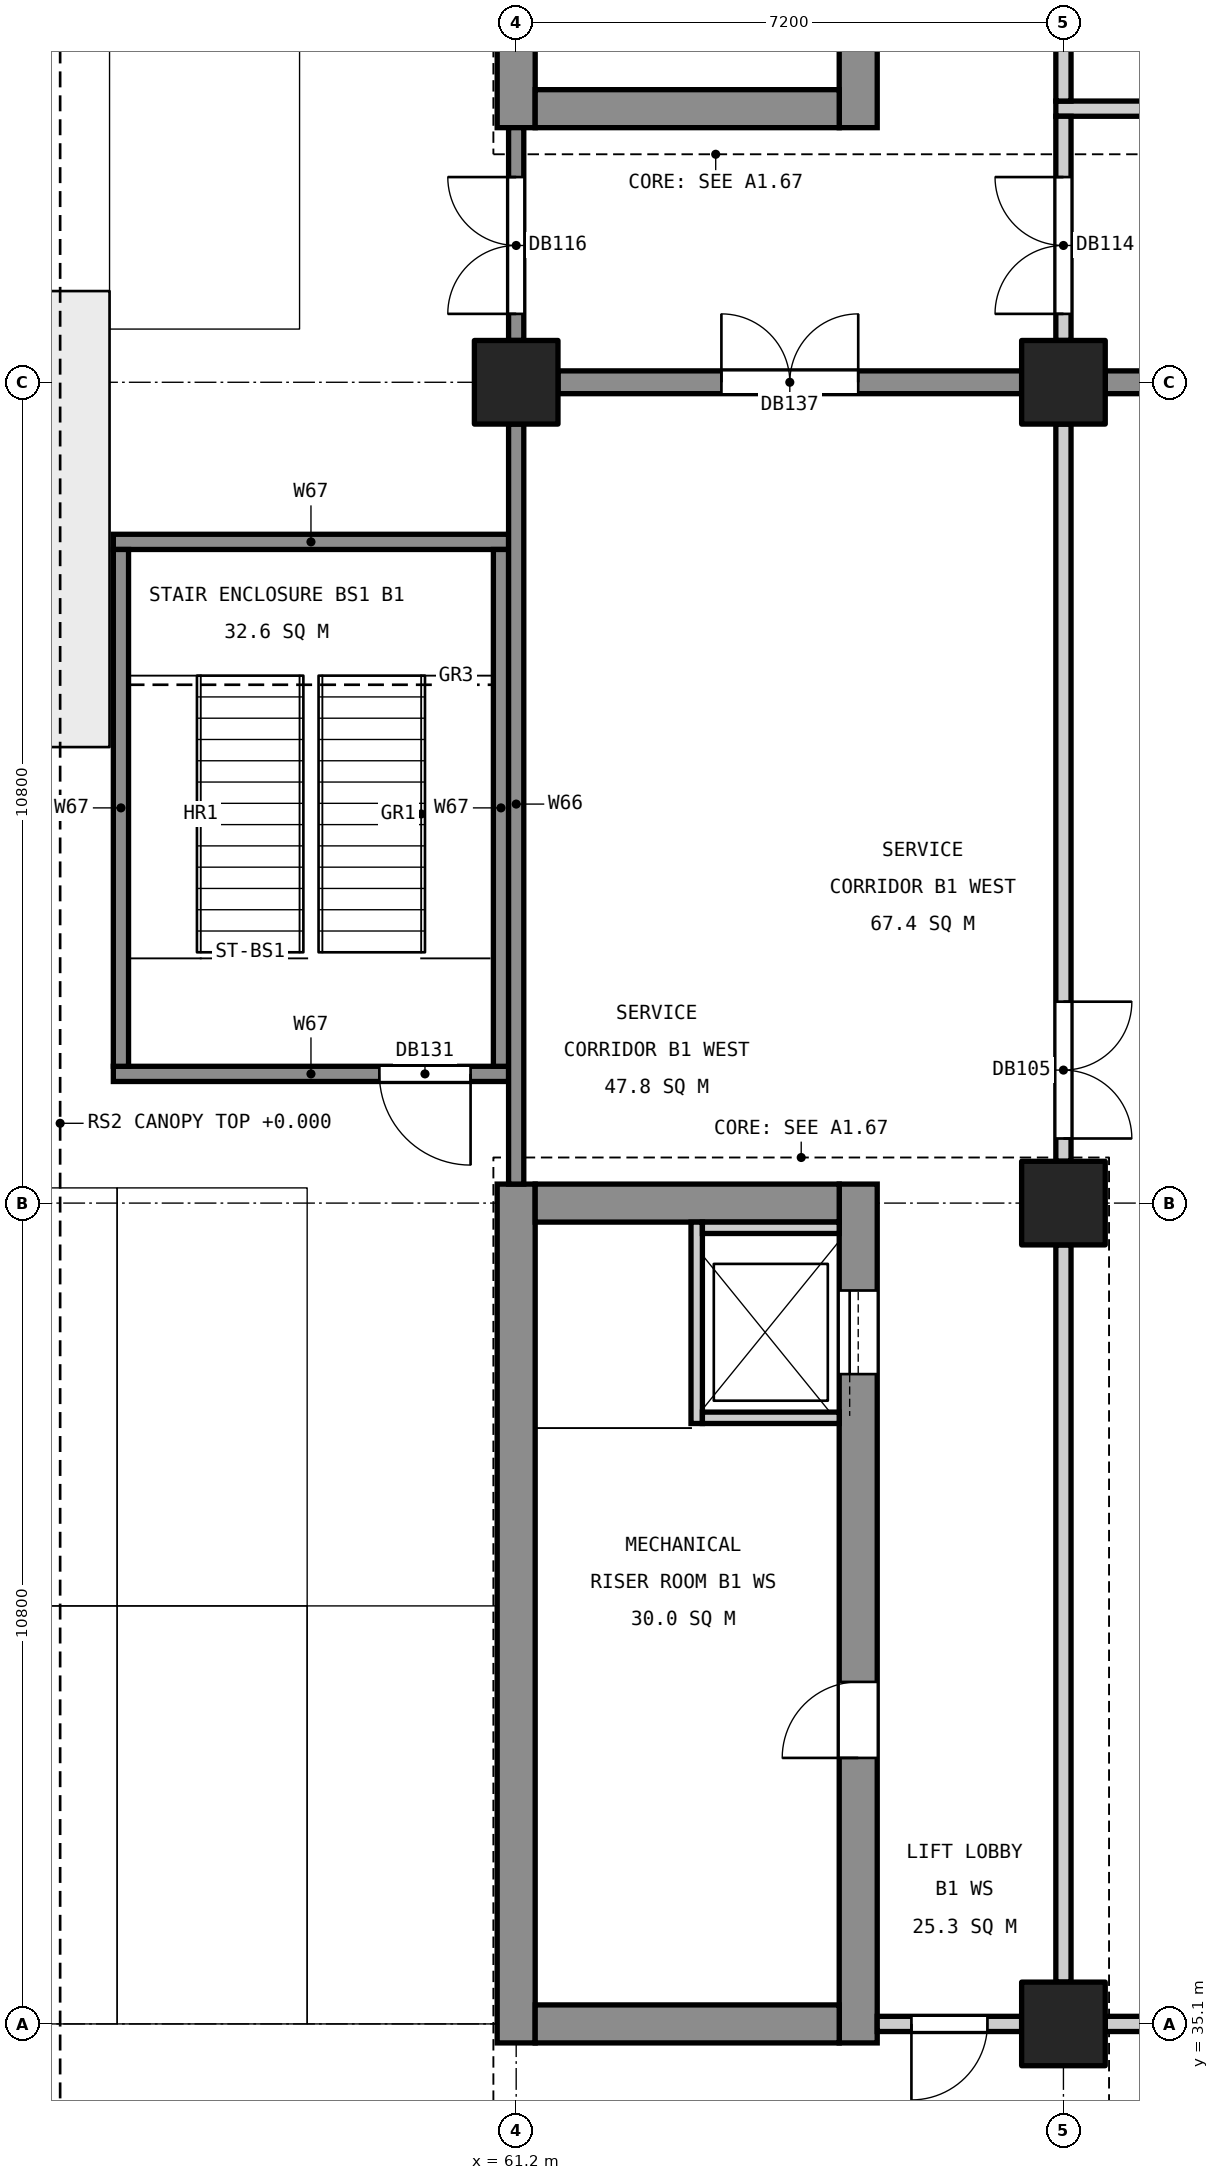
"""IFC4 building model, lengths in metres.
Left out: names, types, materials, properties, quantities, classifications, styles, units other than length and angle.
Written with IfcOpenShell. Run it as: python <this file> out.ifc"""

import sys

from ifc_helpers import new_model, si_unit, direction, frame, frame_2d, origin, origin_2d, place, context, subcontext, project, spatial, rectangle, extrude, element, fill, save


model = new_model("IFC4")
c1 = context("Model", 3, precision=1e-05, world=origin(), true_north=direction((0.0, 1.0)))
c2 = subcontext(c1, "Body", "Model", "MODEL_VIEW")
j1 = project(units=[si_unit("LENGTHUNIT", "METRE"), si_unit("PLANEANGLEUNIT", "RADIAN")], contexts=[c1])
p1 = place(None, origin())
s1 = spatial("IfcSite", under=j1, at=p1, CompositionType="ELEMENT")
p2 = place(p1, origin())
s2 = spatial("IfcBuilding", under=s1, at=p2, CompositionType="ELEMENT")
p3 = place(p2, frame((0.0, 0.0, -4.8)))
s3 = spatial("IfcBuildingStorey", under=s2, at=p3, CompositionType="ELEMENT", Elevation=-4.8)
for number, where, z_axis, x_axis in (
    (1, (61.2, 56.7, 0.0), (0.0, 0.0, 1.0), (1.0, 0.0, 0.0)),
    (2, (68.4, 35.1, 0.0), (0.0, 0.0, 1.0), (1.0, 0.0, 0.0)),
    (3, (68.4, 45.9, 0.0), (0.0, 0.0, 1.0), (1.0, 0.0, 0.0)),
    (4, (68.4, 56.7, 0.0), (0.0, 0.0, 1.0), (1.0, 0.0, 0.0)),
):
    element("IfcColumn", number, at=place(p3, frame(where, z_axis=z_axis, x_axis=x_axis)), inside=s3, PredefinedType="COLUMN", context=c2, shape_type="SweptSolid", body=[
        extrude(rectangle(XDim=1.1, YDim=1.1, at=origin_2d()), origin(), (0.0, 0.0, 1.0), 4.5),
    ])
p4 = place(p3, frame((61.2, 34.85, 0.0), z_axis=(0.0, 0.0, 1.0), x_axis=(0.0, 1.0, 0.0)))
e5 = element("IfcWall", 5, at=p4, inside=s3, PredefinedType="SHEAR", context=c2, shape_type="SweptSolid", body=[
    extrude(rectangle(XDim=11.3, YDim=0.5, at=frame_2d((5.65, 0.0))), origin(), (0.0, 0.0, 1.0), 4.5),
])
p5 = place(p3, frame((65.7, 34.85, 0.0), z_axis=(0.0, 0.0, 1.0), x_axis=(0.0, 1.0, 0.0)))
e6 = element("IfcWall", 6, at=p5, inside=s3, PredefinedType="SHEAR", context=c2, shape_type="SweptSolid", body=[
    extrude(rectangle(XDim=11.3, YDim=0.5, at=frame_2d((5.65, 0.0))), origin(), (0.0, 0.0, 1.0), 4.5),
])
p6 = place(p5, frame((8.8, 0.0, 0.0)))
e7 = element("IfcOpeningElement", 7, at=p6, cuts=e6, PredefinedType="OPENING", context=c2, shape_type="SweptSolid", body=[
    extrude(rectangle(XDim=1.1, YDim=2.1, at=frame_2d((0.55, 1.05))), frame((0.0, 0.26, 0.0), z_axis=(0.0, -1.0, 0.0), x_axis=(1.0, 0.0, 0.0)), (0.0, 0.0, 1.0), 0.52),
])
p7 = place(p5, frame((3.75, 0.0, 0.0)))
e8 = element("IfcOpeningElement", 8, at=p7, cuts=e6, PredefinedType="OPENING", context=c2, shape_type="SweptSolid", body=[
    extrude(rectangle(XDim=1.0, YDim=2.1, at=frame_2d((0.5, 1.05))), frame((0.0, 0.26, 0.0), z_axis=(0.0, -1.0, 0.0), x_axis=(1.0, 0.0, 0.0)), (0.0, 0.0, 1.0), 0.52),
])
for number, where, z_axis, x_axis in (
    (9, (61.45, 35.1, 0.0), (0.0, 0.0, 1.0), (1.0, 0.0, 0.0)),
    (10, (61.45, 45.9, 0.0), (0.0, 0.0, 1.0), (1.0, 0.0, 0.0)),
):
    element("IfcWall", number, at=place(p3, frame(where, z_axis=z_axis, x_axis=x_axis)), inside=s3, PredefinedType="SHEAR", context=c2, shape_type="SweptSolid", body=[
        extrude(rectangle(XDim=4.0, YDim=0.5, at=frame_2d((2.0, 0.0))), origin(), (0.0, 0.0, 1.0), 4.5),
    ])
p8 = place(p3, frame((61.2, 60.05, 0.0), z_axis=(0.0, 0.0, 1.0), x_axis=(0.0, 1.0, 0.0)))
e11 = element("IfcWall", 11, at=p8, inside=s3, PredefinedType="SHEAR", context=c2, shape_type="SweptSolid", body=[
    extrude(rectangle(XDim=14.9, YDim=0.5, at=frame_2d((7.45, 0.0))), origin(), (0.0, 0.0, 1.0), 4.5),
])
p9 = place(p3, frame((65.7, 60.05, 0.0), z_axis=(0.0, 0.0, 1.0), x_axis=(0.0, 1.0, 0.0)))
e12 = element("IfcWall", 12, at=p9, inside=s3, PredefinedType="SHEAR", context=c2, shape_type="SweptSolid", body=[
    extrude(rectangle(XDim=14.9, YDim=0.5, at=frame_2d((7.45, 0.0))), origin(), (0.0, 0.0, 1.0), 4.5),
])
p10 = place(p9, frame((8.85, 0.0, 0.0)))
e13 = element("IfcOpeningElement", 13, at=p10, cuts=e12, PredefinedType="OPENING", context=c2, shape_type="SweptSolid", body=[
    extrude(rectangle(XDim=1.1, YDim=2.1, at=frame_2d((0.55, 1.05))), frame((0.0, 0.26, 0.0), z_axis=(0.0, -1.0, 0.0), x_axis=(1.0, 0.0, 0.0)), (0.0, 0.0, 1.0), 0.52),
])
p11 = place(p9, frame((11.4, 0.0, 0.0)))
e14 = element("IfcOpeningElement", 14, at=p11, cuts=e12, PredefinedType="OPENING", context=c2, shape_type="SweptSolid", body=[
    extrude(rectangle(XDim=1.1, YDim=2.1, at=frame_2d((0.55, 1.05))), frame((0.0, 0.26, 0.0), z_axis=(0.0, -1.0, 0.0), x_axis=(1.0, 0.0, 0.0)), (0.0, 0.0, 1.0), 0.52),
])
p12 = place(p9, frame((3.75, 0.0, 0.0)))
e15 = element("IfcOpeningElement", 15, at=p12, cuts=e12, PredefinedType="OPENING", context=c2, shape_type="SweptSolid", body=[
    extrude(rectangle(XDim=1.0, YDim=2.1, at=frame_2d((0.5, 1.05))), frame((0.0, 0.26, 0.0), z_axis=(0.0, -1.0, 0.0), x_axis=(1.0, 0.0, 0.0)), (0.0, 0.0, 1.0), 0.52),
])
p13 = place(p3, frame((61.45, 60.3, 0.0), z_axis=(0.0, 0.0, 1.0), x_axis=(1.0, 0.0, 0.0)))
e16 = element("IfcWall", 16, at=p13, inside=s3, PredefinedType="SHEAR", context=c2, shape_type="SweptSolid", body=[
    extrude(rectangle(XDim=4.0, YDim=0.5, at=frame_2d((2.0, 0.0))), origin(), (0.0, 0.0, 1.0), 4.5),
])
p14 = place(p3, frame((61.75, 56.7, 0.0), z_axis=(0.0, 0.0, 1.0), x_axis=(1.0, 0.0, 0.0)))
e17 = element("IfcWall", 17, at=p14, inside=s3, PredefinedType="SHEAR", context=c2, shape_type="SweptSolid", body=[
    extrude(rectangle(XDim=6.1, YDim=0.3, at=frame_2d((3.05, 0.0))), origin(), (0.0, 0.0, 1.0), 4.5),
])
p15 = place(p14, frame((2.15, 0.0, 0.0)))
e18 = element("IfcOpeningElement", 18, at=p15, cuts=e17, PredefinedType="OPENING", context=c2, shape_type="SweptSolid", body=[
    extrude(rectangle(XDim=1.8, YDim=2.1, at=frame_2d((0.9, 1.05))), frame((0.0, 0.16, 0.0), z_axis=(0.0, -1.0, 0.0), x_axis=(1.0, 0.0, 0.0)), (0.0, 0.0, 1.0), 0.32),
])
p16 = place(p3, frame((68.95, 56.7, 0.0), z_axis=(0.0, 0.0, 1.0), x_axis=(1.0, 0.0, 0.0)))
e19 = element("IfcWall", 19, at=p16, inside=s3, PredefinedType="SHEAR", context=c2, shape_type="SweptSolid", body=[
    extrude(rectangle(XDim=9.7, YDim=0.3, at=frame_2d((4.85, 0.0))), origin(), (0.0, 0.0, 1.0), 4.5),
])
p17 = place(p3, frame((63.575, 43.0, 0.0), z_axis=(0.0, 0.0, 1.0), x_axis=(0.0, 1.0, 0.0)))
e20 = element("IfcWall", 20, at=p17, inside=s3, PredefinedType="SOLIDWALL", context=c2, shape_type="SweptSolid", body=[
    extrude(rectangle(XDim=2.65, YDim=0.15, at=frame_2d((1.325, 0.0))), origin(), (0.0, 0.0, 1.0), 4.8),
])
for number, where, z_axis, x_axis in (
    (21, (63.65, 43.075, 0.0), (0.0, 0.0, 1.0), (1.0, 0.0, 0.0)),
    (22, (63.65, 45.575, 0.0), (0.0, 0.0, 1.0), (1.0, 0.0, 0.0)),
):
    element("IfcWall", number, at=place(p3, frame(where, z_axis=z_axis, x_axis=x_axis)), inside=s3, PredefinedType="SOLIDWALL", context=c2, shape_type="SweptSolid", body=[
        extrude(rectangle(XDim=1.8, YDim=0.15, at=frame_2d((0.9, 0.0))), origin(), (0.0, 0.0, 1.0), 4.8),
    ])
p18 = place(p3, frame((65.95, 35.1, 0.0), z_axis=(0.0, 0.0, 1.0), x_axis=(1.0, 0.0, 0.0)))
e23 = element("IfcWall", 23, at=p18, inside=s3, PredefinedType="PARTITIONING", context=c2, shape_type="SweptSolid", body=[
    extrude(rectangle(XDim=1.9, YDim=0.2, at=frame_2d((0.95, 0.0))), origin(), (0.0, 0.0, 1.0), 3.7),
])
p19 = place(p18, frame((0.45, 0.0, 0.0)))
e24 = element("IfcOpeningElement", 24, at=p19, cuts=e23, PredefinedType="OPENING", context=c2, shape_type="SweptSolid", body=[
    extrude(rectangle(XDim=1.0, YDim=2.1, at=frame_2d((0.5, 1.05))), frame((0.0, 0.11, 0.0), z_axis=(0.0, -1.0, 0.0), x_axis=(1.0, 0.0, 0.0)), (0.0, 0.0, 1.0), 0.22),
])
p20 = place(p3, frame((68.95, 35.1, 0.0), z_axis=(0.0, 0.0, 1.0), x_axis=(1.0, 0.0, 0.0)))
e25 = element("IfcWall", 25, at=p20, inside=s3, PredefinedType="PARTITIONING", context=c2, shape_type="SweptSolid", body=[
    extrude(rectangle(XDim=9.7, YDim=0.2, at=frame_2d((4.85, 0.0))), origin(), (0.0, 0.0, 1.0), 3.7),
])
p21 = place(p3, frame((55.9, 47.6, 0.0), z_axis=(0.0, 0.0, 1.0), x_axis=(1.0, 0.0, 0.0)))
e26 = element("IfcWall", 26, at=p21, inside=s3, PredefinedType="SOLIDWALL", context=c2, shape_type="SweptSolid", body=[
    extrude(rectangle(XDim=5.2, YDim=0.2, at=frame_2d((2.6, 0.0))), origin(), (0.0, 0.0, 1.0), 4.35),
])
p22 = place(p21, frame((3.5, 0.0, 0.0)))
e27 = element("IfcOpeningElement", 27, at=p22, cuts=e26, PredefinedType="OPENING", context=c2, shape_type="SweptSolid", body=[
    extrude(rectangle(XDim=1.2, YDim=2.1, at=frame_2d((0.6, 1.05))), frame((0.0, 0.11, 0.0), z_axis=(0.0, -1.0, 0.0), x_axis=(1.0, 0.0, 0.0)), (0.0, 0.0, 1.0), 0.22),
])
p23 = place(p3, frame((55.9, 54.6, 0.0), z_axis=(0.0, 0.0, 1.0), x_axis=(1.0, 0.0, 0.0)))
e28 = element("IfcWall", 28, at=p23, inside=s3, PredefinedType="SOLIDWALL", context=c2, shape_type="SweptSolid", body=[
    extrude(rectangle(XDim=5.2, YDim=0.2, at=frame_2d((2.6, 0.0))), origin(), (0.0, 0.0, 1.0), 4.35),
])
p24 = place(p3, frame((68.3, 60.3, 0.0), z_axis=(0.0, 0.0, 1.0), x_axis=(1.0, 0.0, 0.0)))
e29 = element("IfcWall", 29, at=p24, inside=s3, PredefinedType="PARTITIONING", context=c2, shape_type="SweptSolid", body=[
    extrude(rectangle(XDim=11.0, YDim=0.2, at=frame_2d((5.5, 0.0))), origin(), (0.0, 0.0, 1.0), 3.7),
])
p25 = place(p3, frame((56.0, 47.7, 0.0), z_axis=(0.0, 0.0, 1.0), x_axis=(0.0, 1.0, 0.0)))
e30 = element("IfcWall", 30, at=p25, inside=s3, PredefinedType="SOLIDWALL", context=c2, shape_type="SweptSolid", body=[
    extrude(rectangle(XDim=6.8, YDim=0.2, at=frame_2d((3.4, 0.0))), origin(), (0.0, 0.0, 1.0), 4.35),
])
p26 = place(p3, frame((61.0, 47.7, 0.0), z_axis=(0.0, 0.0, 1.0), x_axis=(0.0, 1.0, 0.0)))
e31 = element("IfcWall", 31, at=p26, inside=s3, PredefinedType="SOLIDWALL", context=c2, shape_type="SweptSolid", body=[
    extrude(rectangle(XDim=6.8, YDim=0.2, at=frame_2d((3.4, 0.0))), origin(), (0.0, 0.0, 1.0), 4.5),
])
p27 = place(p3, frame((61.2, 46.15, 0.0), z_axis=(0.0, 0.0, 1.0), x_axis=(0.0, 1.0, 0.0)))
e32 = element("IfcWall", 32, at=p27, inside=s3, PredefinedType="SOLIDWALL", context=c2, shape_type="SweptSolid", body=[
    extrude(rectangle(XDim=10.0, YDim=0.2, at=frame_2d((5.0, 0.0))), origin(), (0.0, 0.0, 1.0), 4.5),
])
p28 = place(p3, frame((61.2, 57.25, 0.0), z_axis=(0.0, 0.0, 1.0), x_axis=(0.0, 1.0, 0.0)))
e33 = element("IfcWall", 33, at=p28, inside=s3, PredefinedType="SOLIDWALL", context=c2, shape_type="SweptSolid", body=[
    extrude(rectangle(XDim=2.8, YDim=0.2, at=frame_2d((1.4, 0.0))), origin(), (0.0, 0.0, 1.0), 4.5),
])
p29 = place(p28, frame((0.35, 0.0, 0.0)))
e34 = element("IfcOpeningElement", 34, at=p29, cuts=e33, PredefinedType="OPENING", context=c2, shape_type="SweptSolid", body=[
    extrude(rectangle(XDim=1.8, YDim=2.1, at=frame_2d((0.9, 1.05))), frame((0.0, 0.11, 0.0), z_axis=(0.0, -1.0, 0.0), x_axis=(1.0, 0.0, 0.0)), (0.0, 0.0, 1.0), 0.22),
])
p30 = place(p3, frame((68.4, 35.65, 0.0), z_axis=(0.0, 0.0, 1.0), x_axis=(0.0, 1.0, 0.0)))
e35 = element("IfcWall", 35, at=p30, inside=s3, PredefinedType="PARTITIONING", context=c2, shape_type="SweptSolid", body=[
    extrude(rectangle(XDim=9.7, YDim=0.2, at=frame_2d((4.85, 0.0))), origin(), (0.0, 0.0, 1.0), 3.4),
])
p31 = place(p3, frame((68.4, 46.45, 0.0), z_axis=(0.0, 0.0, 1.0), x_axis=(0.0, 1.0, 0.0)))
e36 = element("IfcWall", 36, at=p31, inside=s3, PredefinedType="PARTITIONING", context=c2, shape_type="SweptSolid", body=[
    extrude(rectangle(XDim=9.7, YDim=0.2, at=frame_2d((4.85, 0.0))), origin(), (0.0, 0.0, 1.0), 3.4),
])
p32 = place(p31, frame((0.3, 0.0, 0.0)))
e37 = element("IfcOpeningElement", 37, at=p32, cuts=e36, PredefinedType="OPENING", context=c2, shape_type="SweptSolid", body=[
    extrude(rectangle(XDim=1.8, YDim=2.1, at=frame_2d((0.9, 1.05))), frame((0.0, 0.11, 0.0), z_axis=(0.0, -1.0, 0.0), x_axis=(1.0, 0.0, 0.0)), (0.0, 0.0, 1.0), 0.22),
])
p33 = place(p3, frame((68.4, 57.25, 0.0), z_axis=(0.0, 0.0, 1.0), x_axis=(0.0, 1.0, 0.0)))
e38 = element("IfcWall", 38, at=p33, inside=s3, PredefinedType="PARTITIONING", context=c2, shape_type="SweptSolid", body=[
    extrude(rectangle(XDim=2.95, YDim=0.2, at=frame_2d((1.475, 0.0))), origin(), (0.0, 0.0, 1.0), 3.4),
])
p34 = place(p33, frame((0.35, 0.0, 0.0)))
e39 = element("IfcOpeningElement", 39, at=p34, cuts=e38, PredefinedType="OPENING", context=c2, shape_type="SweptSolid", body=[
    extrude(rectangle(XDim=1.8, YDim=2.1, at=frame_2d((0.9, 1.05))), frame((0.0, 0.11, 0.0), z_axis=(0.0, -1.0, 0.0), x_axis=(1.0, 0.0, 0.0)), (0.0, 0.0, 1.0), 0.22),
])
p35 = place(p3, frame((68.4, 60.4, 0.0), z_axis=(0.0, 0.0, 1.0), x_axis=(0.0, 1.0, 0.0)))
e40 = element("IfcWall", 40, at=p35, inside=s3, PredefinedType="PARTITIONING", context=c2, shape_type="SweptSolid", body=[
    extrude(rectangle(XDim=6.55, YDim=0.2, at=frame_2d((3.275, 0.0))), origin(), (0.0, 0.0, 1.0), 3.4),
])
p36 = place(p6, origin())
e41 = element("IfcDoor", 41, at=p36, inside=s3, OperationType="SLIDING_TO_LEFT", PredefinedType="DOOR", context=c2, shape_type="SweptSolid", body=[
    extrude(rectangle(XDim=1.1, YDim=2.1, at=frame_2d((0.55, 1.05))), frame((0.0, 0.025, 0.0), z_axis=(0.0, -1.0, 0.0), x_axis=(1.0, 0.0, 0.0)), (0.0, 0.0, 1.0), 0.05),
])
fill(e7, e41)
p37 = place(p32, frame((1.8, 0.0, 0.0), z_axis=(0.0, 0.0, 1.0), x_axis=(-1.0, 0.0, 0.0)))
e42 = element("IfcDoor", 42, at=p37, inside=s3, OperationType="DOUBLE_DOOR_SINGLE_SWING", PredefinedType="DOOR", context=c2, shape_type="SweptSolid", body=[
    extrude(rectangle(XDim=1.8, YDim=2.1, at=frame_2d((0.9, 1.05))), frame((0.0, 0.025, 0.0), z_axis=(0.0, -1.0, 0.0), x_axis=(1.0, 0.0, 0.0)), (0.0, 0.0, 1.0), 0.05),
])
fill(e37, e42)
p38 = place(p19, frame((1.0, 0.0, 0.0), z_axis=(0.0, 0.0, 1.0), x_axis=(-1.0, 0.0, 0.0)))
e43 = element("IfcDoor", 43, at=p38, inside=s3, OperationType="SINGLE_SWING_RIGHT", PredefinedType="DOOR", context=c2, shape_type="SweptSolid", body=[
    extrude(rectangle(XDim=1.0, YDim=2.1, at=frame_2d((0.5, 1.05))), frame((0.0, 0.025, 0.0), z_axis=(0.0, -1.0, 0.0), x_axis=(1.0, 0.0, 0.0)), (0.0, 0.0, 1.0), 0.05),
])
fill(e24, e43)
p39 = place(p34, origin())
e44 = element("IfcDoor", 44, at=p39, inside=s3, OperationType="DOUBLE_DOOR_SINGLE_SWING", PredefinedType="DOOR", context=c2, shape_type="SweptSolid", body=[
    extrude(rectangle(XDim=1.8, YDim=2.1, at=frame_2d((0.9, 1.05))), frame((0.0, 0.025, 0.0), z_axis=(0.0, -1.0, 0.0), x_axis=(1.0, 0.0, 0.0)), (0.0, 0.0, 1.0), 0.05),
])
fill(e39, e44)
p40 = place(p29, origin())
e45 = element("IfcDoor", 45, at=p40, inside=s3, OperationType="DOUBLE_DOOR_SINGLE_SWING", PredefinedType="DOOR", context=c2, shape_type="SweptSolid", body=[
    extrude(rectangle(XDim=1.8, YDim=2.1, at=frame_2d((0.9, 1.05))), frame((0.0, 0.025, 0.0), z_axis=(0.0, -1.0, 0.0), x_axis=(1.0, 0.0, 0.0)), (0.0, 0.0, 1.0), 0.05),
])
fill(e34, e45)
p41 = place(p7, origin())
e46 = element("IfcDoor", 46, at=p41, inside=s3, OperationType="SINGLE_SWING_LEFT", PredefinedType="DOOR", context=c2, shape_type="SweptSolid", body=[
    extrude(rectangle(XDim=1.0, YDim=2.1, at=frame_2d((0.5, 1.05))), frame((0.0, 0.025, 0.0), z_axis=(0.0, -1.0, 0.0), x_axis=(1.0, 0.0, 0.0)), (0.0, 0.0, 1.0), 0.05),
])
fill(e8, e46)
p42 = place(p22, frame((1.2, 0.0, 0.0), z_axis=(0.0, 0.0, 1.0), x_axis=(-1.0, 0.0, 0.0)))
e47 = element("IfcDoor", 47, at=p42, inside=s3, OperationType="SINGLE_SWING_LEFT", PredefinedType="DOOR", context=c2, shape_type="SweptSolid", body=[
    extrude(rectangle(XDim=1.2, YDim=2.1, at=frame_2d((0.6, 1.05))), frame((0.0, 0.025, 0.0), z_axis=(0.0, -1.0, 0.0), x_axis=(1.0, 0.0, 0.0)), (0.0, 0.0, 1.0), 0.05),
])
fill(e27, e47)
p43 = place(p15, origin())
e48 = element("IfcDoor", 48, at=p43, inside=s3, OperationType="DOUBLE_DOOR_SINGLE_SWING", PredefinedType="DOOR", context=c2, shape_type="SweptSolid", body=[
    extrude(rectangle(XDim=1.8, YDim=2.1, at=frame_2d((0.9, 1.05))), frame((0.0, 0.025, 0.0), z_axis=(0.0, -1.0, 0.0), x_axis=(1.0, 0.0, 0.0)), (0.0, 0.0, 1.0), 0.05),
])
fill(e18, e48)
save(model, sys.argv[1])
